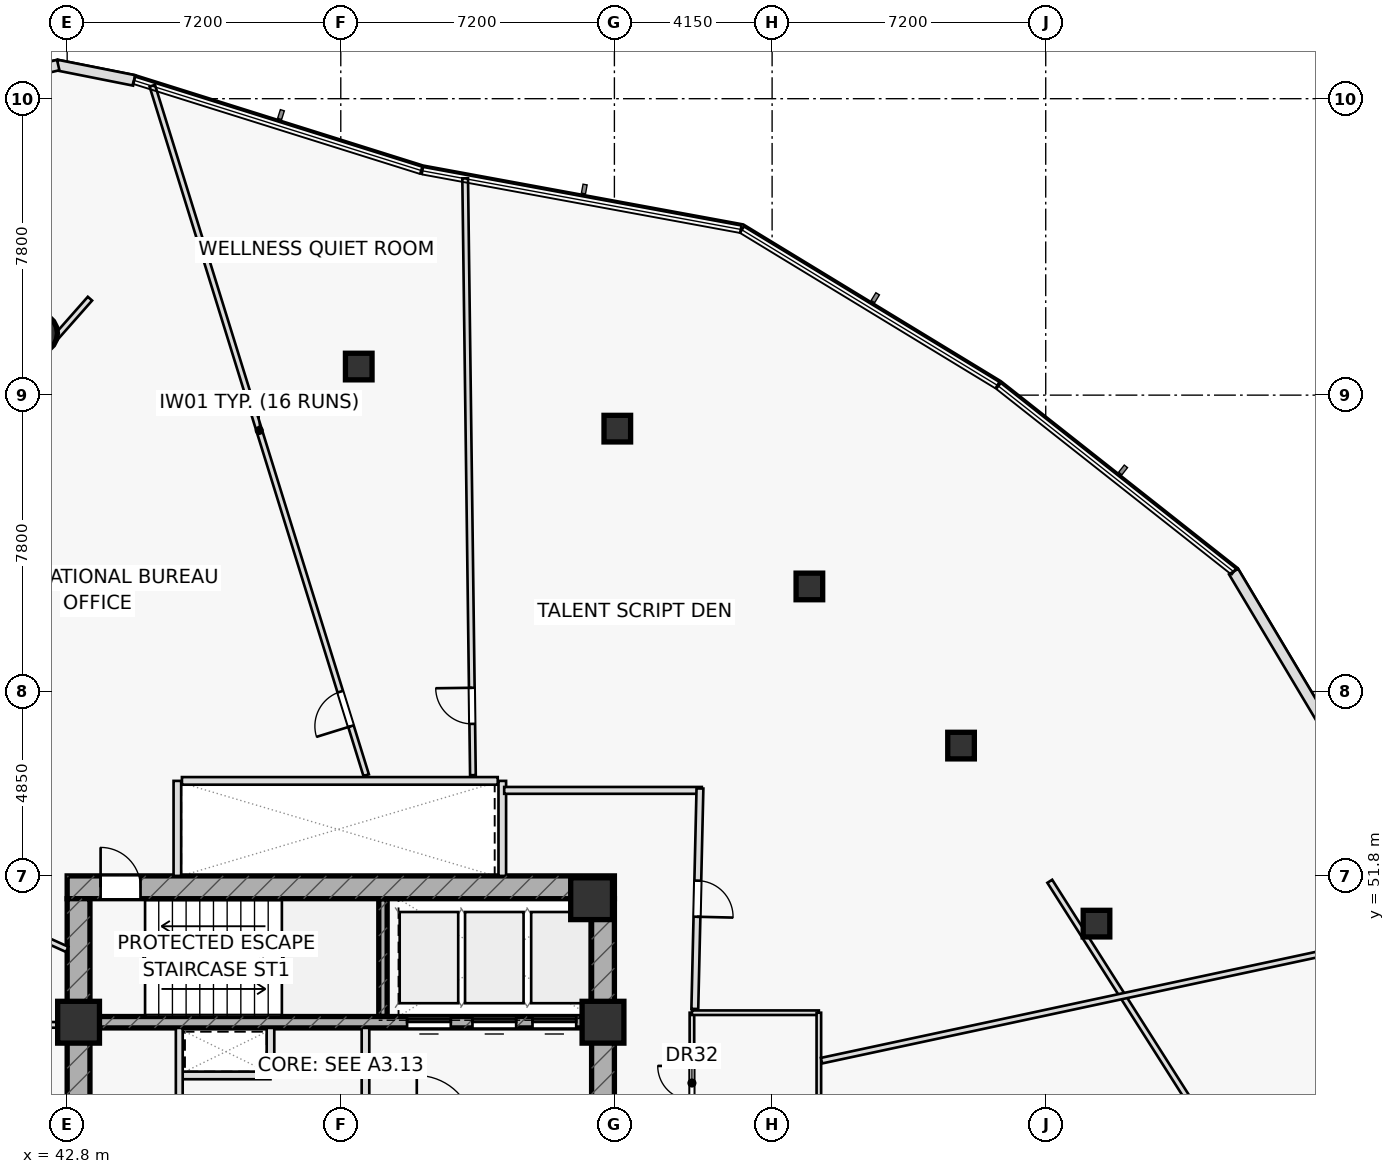
"""IFC4 building model, lengths in metres.
Left out: names, types, materials, properties, quantities, classifications, styles, units other than length and angle.
Written with IfcOpenShell. Run it as: python <this file> out.ifc"""

import sys

from ifc_helpers import new_model, si_unit, direction, frame, frame_2d, origin, origin_2d, place, context, subcontext, project, spatial, rectangle, hollow_rectangle, hollow_circle, extrude, element, fill, save


model = new_model("IFC4")
c1 = context("Model", 3, precision=1e-05, world=origin(), true_north=direction((0.0, 1.0)))
c2 = subcontext(c1, "Body", "Model", "MODEL_VIEW")
j1 = project(units=[si_unit("LENGTHUNIT", "METRE"), si_unit("PLANEANGLEUNIT", "RADIAN")], contexts=[c1])
p1 = place(None, origin())
s1 = spatial("IfcSite", under=j1, at=p1, CompositionType="ELEMENT")
p2 = place(p1, origin())
s2 = spatial("IfcBuilding", under=s1, at=p2, CompositionType="ELEMENT")
p3 = place(p2, frame((0.0, 0.0, 138.7)))
s3 = spatial("IfcBuildingStorey", under=s2, at=p3, CompositionType="ELEMENT", Elevation=138.7)
p4 = place(p3, frame((51.11, 48.1, 0.0), z_axis=(0.0, 0.0, 1.0), x_axis=(0.0, 1.0, 0.0)))
e1 = element("IfcWall", 1, at=p4, inside=s3, PredefinedType="SHEAR", context=c2, shape_type="SweptSolid", body=[
    extrude(rectangle(XDim=3.1, YDim=0.22, at=frame_2d((1.55, 0.0))), origin(), (0.0, 0.0, 1.0), 3.55),
])
p5 = place(p3, frame((42.8, 51.5, 0.0), z_axis=(0.0, 0.0, 1.0), x_axis=(1.0, 0.0, 0.0)))
e2 = element("IfcWall", 2, at=p5, inside=s3, PredefinedType="SHEAR", context=c2, shape_type="SweptSolid", body=[
    extrude(rectangle(XDim=14.4, YDim=0.6, at=frame_2d((7.2, 0.0))), origin(), (0.0, 0.0, 1.0), 3.55),
])
p6 = place(p5, frame((0.88, 0.0, 0.0)))
e3 = element("IfcOpeningElement", 3, at=p6, cuts=e2, PredefinedType="OPENING", context=c2, shape_type="SweptSolid", body=[
    extrude(rectangle(XDim=1.05, YDim=2.2, at=frame_2d((0.525, 1.1))), frame((0.0, 0.31, 0.0), z_axis=(0.0, -1.0, 0.0), x_axis=(1.0, 0.0, 0.0)), (0.0, 0.0, 1.0), 0.62),
])
p7 = place(p3, frame((43.1, 38.8, 0.0), z_axis=(0.0, 0.0, 1.0), x_axis=(0.0, 1.0, 0.0)))
e4 = element("IfcWall", 4, at=p7, inside=s3, PredefinedType="SHEAR", context=c2, shape_type="SweptSolid", body=[
    extrude(rectangle(XDim=12.4, YDim=0.6, at=frame_2d((6.2, 0.0))), origin(), (0.0, 0.0, 1.0), 3.55),
])
p8 = place(p3, frame((56.9, 38.8, 0.0), z_axis=(0.0, 0.0, 1.0), x_axis=(0.0, 1.0, 0.0)))
e5 = element("IfcWall", 5, at=p8, inside=s3, PredefinedType="SHEAR", context=c2, shape_type="SweptSolid", body=[
    extrude(rectangle(XDim=12.4, YDim=0.6, at=frame_2d((6.2, 0.0))), origin(), (0.0, 0.0, 1.0), 3.55),
])
p9 = place(p8, frame((3.85, 0.0, 0.0)))
e6 = element("IfcOpeningElement", 6, at=p9, cuts=e5, PredefinedType="OPENING", context=c2, shape_type="SweptSolid", body=[
    extrude(rectangle(XDim=1.5, YDim=2.2, at=frame_2d((0.75, 1.1))), frame((0.0, 0.31, 0.0), z_axis=(0.0, -1.0, 0.0), x_axis=(1.0, 0.0, 0.0)), (0.0, 0.0, 1.0), 0.62),
])
p10 = place(p3, frame((43.4, 47.95, 0.0), z_axis=(0.0, 0.0, 1.0), x_axis=(1.0, 0.0, 0.0)))
e7 = element("IfcWall", 7, at=p10, inside=s3, PredefinedType="SHEAR", context=c2, shape_type="SweptSolid", body=[
    extrude(rectangle(XDim=13.2, YDim=0.3, at=frame_2d((6.6, 0.0))), origin(), (0.0, 0.0, 1.0), 3.55),
])
p11 = place(p10, frame((8.345, 0.0, 0.0)))
e8 = element("IfcOpeningElement", 8, at=p11, cuts=e7, PredefinedType="OPENING", context=c2, shape_type="SweptSolid", body=[
    extrude(rectangle(XDim=1.15, YDim=2.2, at=frame_2d((0.575, 1.1))), frame((0.0, 0.16, 0.0), z_axis=(0.0, -1.0, 0.0), x_axis=(1.0, 0.0, 0.0)), (0.0, 0.0, 1.0), 0.32),
])
p12 = place(p10, frame((10.065, 0.0, 0.0)))
e9 = element("IfcOpeningElement", 9, at=p12, cuts=e7, PredefinedType="OPENING", context=c2, shape_type="SweptSolid", body=[
    extrude(rectangle(XDim=1.15, YDim=2.2, at=frame_2d((0.575, 1.1))), frame((0.0, 0.16, 0.0), z_axis=(0.0, -1.0, 0.0), x_axis=(1.0, 0.0, 0.0)), (0.0, 0.0, 1.0), 0.32),
])
p13 = place(p10, frame((11.645, 0.0, 0.0)))
e10 = element("IfcOpeningElement", 10, at=p13, cuts=e7, PredefinedType="OPENING", context=c2, shape_type="SweptSolid", body=[
    extrude(rectangle(XDim=1.15, YDim=2.2, at=frame_2d((0.575, 1.1))), frame((0.0, 0.16, 0.0), z_axis=(0.0, -1.0, 0.0), x_axis=(1.0, 0.0, 0.0)), (0.0, 0.0, 1.0), 0.32),
])
for number, where, z_axis, x_axis in (
    (11, (43.1, 47.95, 0.0), (0.0, 0.0, 1.0), (1.0, 0.0, 0.0)),
    (12, (56.9, 47.95, 0.0), (0.0, 0.0, 1.0), (1.0, 0.0, 0.0)),
    (13, (56.6, 51.2, 0.0), (0.0, 0.0, 1.0), (1.0, 0.0, 0.0)),
):
    element("IfcColumn", number, at=place(p3, frame(where, z_axis=z_axis, x_axis=x_axis)), inside=s3, PredefinedType="COLUMN", context=c2, shape_type="SweptSolid", body=[
        extrude(rectangle(XDim=1.1, YDim=1.1, at=origin_2d()), origin(), (0.0, 0.0, 1.0), 3.55),
    ])
p14 = place(p3, frame((42.011, 66.08, 0.0), z_axis=(0.0, 0.0, 1.0), x_axis=(1.0, 0.0, 0.0)))
e14 = element("IfcColumn", 14, at=p14, inside=s3, PredefinedType="COLUMN", context=c2, shape_type="SweptSolid", body=[
    extrude(hollow_circle(Radius=0.533, WallThickness=0.045, at=origin_2d()), origin(), (0.0, 0.0, 1.0), 3.55),
])
for number, where, z_axis, x_axis in (
    (15, (69.886, 50.544, 0.0), (0.0, 0.0, 1.0), (1.0, 0.0, 0.0)),
    (16, (66.322, 55.229, 0.0), (0.0, 0.0, 1.0), (1.0, 0.0, 0.0)),
    (17, (62.331, 59.416, 0.0), (0.0, 0.0, 1.0), (1.0, 0.0, 0.0)),
    (18, (57.277, 63.568, 0.0), (0.0, 0.0, 1.0), (1.0, 0.0, 0.0)),
    (19, (50.472, 65.202, 0.0), (0.0, 0.0, 1.0), (1.0, 0.0, 0.0)),
):
    element("IfcColumn", number, at=place(p3, frame(where, z_axis=z_axis, x_axis=x_axis)), inside=s3, PredefinedType="COLUMN", context=c2, shape_type="SweptSolid", body=[
        extrude(hollow_rectangle(XDim=0.7, YDim=0.7, WallThickness=0.04, at=origin_2d()), origin(), (0.0, 0.0, 1.0), 3.55),
    ])
for number, where, z_axis, x_axis in (
    (20, (45.7, 51.8, 0.0), (0.0, 0.0, 1.0), (0.0, 1.0, 0.0)),
    (21, (54.25, 51.8, 0.0), (0.0, 0.0, 1.0), (0.0, 1.0, 0.0)),
):
    element("IfcWall", number, at=place(p3, frame(where, z_axis=z_axis, x_axis=x_axis)), inside=s3, PredefinedType="PARTITIONING", context=c2, shape_type="SweptSolid", body=[
        extrude(rectangle(XDim=2.5, YDim=0.2, at=frame_2d((1.25, 0.0))), origin(), (0.0, 0.0, 1.0), 3.55),
    ])
p15 = place(p3, frame((45.75, 46.55, 0.0), z_axis=(0.0, 0.0, 1.0), x_axis=(1.0, 0.0, 0.0)))
e22 = element("IfcWall", 22, at=p15, inside=s3, PredefinedType="PARTITIONING", context=c2, shape_type="SweptSolid", body=[
    extrude(rectangle(XDim=2.4, YDim=0.2, at=frame_2d((1.2, 0.0))), origin(), (0.0, 0.0, 1.0), 3.55),
])
p16 = place(p3, frame((48.15, 46.55, 0.0), z_axis=(0.0, 0.0, 1.0), x_axis=(0.0, 1.0, 0.0)))
e23 = element("IfcWall", 23, at=p16, inside=s3, PredefinedType="PARTITIONING", context=c2, shape_type="SweptSolid", body=[
    extrude(rectangle(XDim=1.25, YDim=0.2, at=frame_2d((0.625, 0.0))), origin(), (0.0, 0.0, 1.0), 3.55),
])
p17 = place(p3, frame((50.65, 45.05, 0.0), z_axis=(0.0, 0.0, 1.0), x_axis=(0.0, 1.0, 0.0)))
e24 = element("IfcWall", 24, at=p17, inside=s3, PredefinedType="PARTITIONING", context=c2, shape_type="SweptSolid", body=[
    extrude(rectangle(XDim=2.75, YDim=0.2, at=frame_2d((1.375, 0.0))), origin(), (0.0, 0.0, 1.0), 3.55),
])
p18 = place(p3, frame((45.75, 42.2, 0.0), z_axis=(0.0, 0.0, 1.0), x_axis=(0.0, 1.0, 0.0)))
e25 = element("IfcWall", 25, at=p18, inside=s3, PredefinedType="PARTITIONING", context=c2, shape_type="SweptSolid", body=[
    extrude(rectangle(XDim=5.6, YDim=0.18, at=frame_2d((2.8, 0.0))), origin(), (0.0, 0.0, 1.0), 3.55),
])
p19 = place(p18, frame((0.55, 0.0, 0.0)))
e26 = element("IfcOpeningElement", 26, at=p19, cuts=e25, PredefinedType="OPENING", context=c2, shape_type="SweptSolid", body=[
    extrude(rectangle(XDim=0.9, YDim=2.05, at=frame_2d((0.45, 1.025))), frame((0.0, 0.1, 0.0), z_axis=(0.0, -1.0, 0.0), x_axis=(1.0, 0.0, 0.0)), (0.0, 0.0, 1.0), 0.2),
])
p20 = place(p18, frame((2.9, 0.0, 0.0)))
e27 = element("IfcOpeningElement", 27, at=p20, cuts=e25, PredefinedType="OPENING", context=c2, shape_type="SweptSolid", body=[
    extrude(rectangle(XDim=0.85, YDim=2.05, at=frame_2d((0.425, 1.025))), frame((0.0, 0.1, 0.0), z_axis=(0.0, -1.0, 0.0), x_axis=(1.0, 0.0, 0.0)), (0.0, 0.0, 1.0), 0.2),
])
p21 = place(p3, frame((43.4, 66.989, 0.0), z_axis=(0.0, 0.0, 1.0), x_axis=(-0.661622343701, -0.749837231881, 0.0)))
e28 = element("IfcWall", 28, at=p21, inside=s3, PredefinedType="PARTITIONING", context=c2, shape_type="SweptSolid", body=[
    extrude(rectangle(XDim=11.427, YDim=0.15, at=frame_2d((5.714, 0.0))), origin(), (0.0, 0.0, 1.0), 2.835),
])
p22 = place(p3, frame((74.163, 42.993, 0.0), z_axis=(0.0, 0.0, 1.0), x_axis=(-0.53628142437, 0.844039237166, 0.0)))
e29 = element("IfcWall", 29, at=p22, inside=s3, PredefinedType="PARTITIONING", context=c2, shape_type="SweptSolid", body=[
    extrude(rectangle(XDim=10.267, YDim=0.15, at=frame_2d((5.133, 0.0))), origin(), (0.0, 0.0, 1.0), 2.835),
])
p23 = place(p3, frame((37.14, 47.88, 0.0), z_axis=(0.0, 0.0, 1.0), x_axis=(1.0, 0.0, 0.0)))
e30 = element("IfcWall", 30, at=p23, inside=s3, PredefinedType="PARTITIONING", context=c2, shape_type="SweptSolid", body=[
    extrude(rectangle(XDim=5.66, YDim=0.15, at=frame_2d((2.83, 0.0))), origin(), (0.0, 0.0, 1.0), 2.835),
])
p24 = place(p3, frame((59.24, 41.2, 0.0), z_axis=(0.0, 0.0, 1.0), x_axis=(0.0, 1.0, 0.0)))
e31 = element("IfcWall", 31, at=p24, inside=s3, PredefinedType="PARTITIONING", context=c2, shape_type="SweptSolid", body=[
    extrude(rectangle(XDim=7.0, YDim=0.12, at=frame_2d((3.5, 0.0))), origin(), (0.0, 0.0, 1.0), 3.55),
])
p25 = place(p24, frame((1.15, 0.0, 0.0)))
e32 = element("IfcOpeningElement", 32, at=p25, cuts=e31, PredefinedType="OPENING", context=c2, shape_type="SweptSolid", body=[
    extrude(rectangle(XDim=0.9, YDim=2.05, at=frame_2d((0.45, 1.025))), frame((0.0, 0.07, 0.0), z_axis=(0.0, -1.0, 0.0), x_axis=(1.0, 0.0, 0.0)), (0.0, 0.0, 1.0), 0.14),
])
p26 = place(p24, frame((4.7, 0.0, 0.0)))
e33 = element("IfcOpeningElement", 33, at=p26, cuts=e31, PredefinedType="OPENING", context=c2, shape_type="SweptSolid", body=[
    extrude(rectangle(XDim=0.9, YDim=2.05, at=frame_2d((0.45, 1.025))), frame((0.0, 0.07, 0.0), z_axis=(0.0, -1.0, 0.0), x_axis=(1.0, 0.0, 0.0)), (0.0, 0.0, 1.0), 0.14),
])
p27 = place(p3, frame((59.24, 48.2, 0.0), z_axis=(0.0, 0.0, 1.0), x_axis=(1.0, 0.0, 0.0)))
e34 = element("IfcWall", 34, at=p27, inside=s3, PredefinedType="PARTITIONING", context=c2, shape_type="SweptSolid", body=[
    extrude(rectangle(XDim=3.34, YDim=0.12, at=frame_2d((1.67, 0.0))), origin(), (0.0, 0.0, 1.0), 3.55),
])
p28 = place(p3, frame((62.58, 41.2, 0.0), z_axis=(0.0, 0.0, 1.0), x_axis=(0.0, 1.0, 0.0)))
e35 = element("IfcWall", 35, at=p28, inside=s3, PredefinedType="PARTITIONING", context=c2, shape_type="SweptSolid", body=[
    extrude(rectangle(XDim=7.0, YDim=0.12, at=frame_2d((3.5, 0.0))), origin(), (0.0, 0.0, 1.0), 3.55),
])
p29 = place(p3, frame((62.65, 46.938, 0.0), z_axis=(0.0, 0.0, 1.0), x_axis=(0.977819728846, 0.209448270173, 0.0)))
e36 = element("IfcWall", 36, at=p29, inside=s3, PredefinedType="PARTITIONING", context=c2, shape_type="SweptSolid", body=[
    extrude(rectangle(XDim=17.123, YDim=0.15, at=frame_2d((8.562, 0.0))), origin(), (0.0, 0.0, 1.0), 2.975),
])
p30 = place(p3, frame((53.477, 54.45, 0.0), z_axis=(0.0, 0.0, 1.0), x_axis=(-0.012994596741, 0.999915566663, 0.0)))
e37 = element("IfcWall", 37, at=p30, inside=s3, PredefinedType="PARTITIONING", context=c2, shape_type="SweptSolid", body=[
    extrude(rectangle(XDim=15.707, YDim=0.15, at=frame_2d((7.853, 0.0))), origin(), (0.0, 0.0, 1.0), 2.835),
])
p31 = place(p30, frame((1.35, 0.0, 0.0)))
e38 = element("IfcOpeningElement", 38, at=p31, cuts=e37, PredefinedType="OPENING", context=c2, shape_type="SweptSolid", body=[
    extrude(rectangle(XDim=0.95, YDim=2.05, at=frame_2d((0.475, 1.025))), frame((0.0, 0.085, 0.0), z_axis=(0.0, -1.0, 0.0), x_axis=(1.0, 0.0, 0.0)), (0.0, 0.0, 1.0), 0.17),
])
p32 = place(p3, frame((50.668, 54.45, 0.0), z_axis=(0.0, 0.0, 1.0), x_axis=(-0.29631148368, 0.955091359316, 0.0)))
e39 = element("IfcWall", 39, at=p32, inside=s3, PredefinedType="PARTITIONING", context=c2, shape_type="SweptSolid", body=[
    extrude(rectangle(XDim=18.994, YDim=0.15, at=frame_2d((9.497, 0.0))), origin(), (0.0, 0.0, 1.0), 2.975),
])
p33 = place(p32, frame((1.35, 0.0, 0.0)))
e40 = element("IfcOpeningElement", 40, at=p33, cuts=e39, PredefinedType="OPENING", context=c2, shape_type="SweptSolid", body=[
    extrude(rectangle(XDim=0.95, YDim=2.05, at=frame_2d((0.475, 1.025))), frame((0.0, 0.085, 0.0), z_axis=(0.0, -1.0, 0.0), x_axis=(1.0, 0.0, 0.0)), (0.0, 0.0, 1.0), 0.17),
])
p34 = place(p3, frame((42.8, 49.867, 0.0), z_axis=(0.0, 0.0, 1.0), x_axis=(-0.911695751271, 0.410865984372, 0.0)))
e41 = element("IfcWall", 41, at=p34, inside=s3, PredefinedType="PARTITIONING", context=c2, shape_type="SweptSolid", body=[
    extrude(rectangle(XDim=10.893, YDim=0.15, at=frame_2d((5.447, 0.0))), origin(), (0.0, 0.0, 1.0), 2.835),
])
p35 = place(p34, frame((1.35, 0.0, 0.0)))
e42 = element("IfcOpeningElement", 42, at=p35, cuts=e41, PredefinedType="OPENING", context=c2, shape_type="SweptSolid", body=[
    extrude(rectangle(XDim=0.95, YDim=2.05, at=frame_2d((0.475, 1.025))), frame((0.0, 0.085, 0.0), z_axis=(0.0, -1.0, 0.0), x_axis=(1.0, 0.0, 0.0)), (0.0, 0.0, 1.0), 0.17),
])
p36 = place(p3, frame((54.3, 54.05, 0.0), z_axis=(0.0, 0.0, 1.0), x_axis=(1.0, 0.0, 0.0)))
e43 = element("IfcWall", 43, at=p36, inside=s3, PredefinedType="PARTITIONING", context=c2, shape_type="SweptSolid", body=[
    extrude(rectangle(XDim=5.2, YDim=0.18, at=frame_2d((2.6, 0.0))), origin(), (0.0, 0.0, 1.0), 2.835),
])
p37 = place(p3, frame((59.451, 54.1, 0.0), z_axis=(0.0, 0.0, 1.0), x_axis=(-0.023271046154, -0.999729192537, 0.0)))
e44 = element("IfcWall", 44, at=p37, inside=s3, PredefinedType="PARTITIONING", context=c2, shape_type="SweptSolid", body=[
    extrude(rectangle(XDim=5.802, YDim=0.18, at=frame_2d((2.901, 0.0))), origin(), (0.0, 0.0, 1.0), 2.835),
])
p38 = place(p37, frame((2.426, 0.0, 0.0)))
e45 = element("IfcOpeningElement", 45, at=p38, cuts=e44, PredefinedType="OPENING", context=c2, shape_type="SweptSolid", body=[
    extrude(rectangle(XDim=0.95, YDim=2.05, at=frame_2d((0.475, 1.025))), frame((0.0, 0.1, 0.0), z_axis=(0.0, -1.0, 0.0), x_axis=(1.0, 0.0, 0.0)), (0.0, 0.0, 1.0), 0.2),
])
p39 = place(p3, frame((44.562, 72.731, 0.0), z_axis=(0.0, 0.0, 1.0), x_axis=(-0.98078915881, 0.195070822936, 0.0)))
e46 = element("IfcWall", 46, at=p39, inside=s3, PredefinedType="STANDARD", context=c2, shape_type="SweptSolid", body=[
    extrude(rectangle(XDim=2.066, YDim=0.28, at=frame_2d((1.033, 0.0))), origin(), (0.0, 0.0, 1.0), 3.55),
])
p40 = place(p3, frame((42.565, 73.135, 0.0), z_axis=(0.0, 0.0, 1.0), x_axis=(-0.97418452395, -0.225753213258, 0.0)))
e47 = element("IfcWall", 47, at=p40, inside=s3, PredefinedType="STANDARD", context=c2, shape_type="SweptSolid", body=[
    extrude(rectangle(XDim=2.055, YDim=0.28, at=frame_2d((1.027, 0.0))), origin(), (0.0, 0.0, 1.0), 3.55),
])
p41 = place(p3, frame((77.885, 52.448, 0.0), z_axis=(0.0, 0.0, 1.0), x_axis=(-0.512462591372, 0.858709550689, 0.0)))
e48 = element("IfcWall", 48, at=p41, inside=s3, PredefinedType="STANDARD", context=c2, shape_type="SweptSolid", body=[
    extrude(rectangle(XDim=8.571, YDim=0.28, at=frame_2d((4.285, 0.0))), origin(), (0.0, 0.0, 1.0), 3.55),
])
p42 = place(p3, frame((45.82, 54.3, 0.0), z_axis=(0.0, 0.0, 1.0), x_axis=(1.0, 0.0, 0.0)))
e49 = element("IfcWall", 49, at=p42, inside=s3, PredefinedType="PARTITIONING", context=c2, shape_type="SweptSolid", body=[
    extrude(rectangle(XDim=8.31, YDim=0.2, at=frame_2d((4.155, 0.0))), origin(), (0.0, 0.0, 1.0), 3.55),
])
p43 = place(p6, origin())
e50 = element("IfcDoor", 50, at=p43, inside=s3, OperationType="SINGLE_SWING_LEFT", PredefinedType="DOOR", context=c2, shape_type="SweptSolid", body=[
    extrude(rectangle(XDim=1.05, YDim=2.2, at=frame_2d((0.525, 1.1))), frame((0.0, 0.025, 0.0), z_axis=(0.0, -1.0, 0.0), x_axis=(1.0, 0.0, 0.0)), (0.0, 0.0, 1.0), 0.05),
])
fill(e3, e50)
p44 = place(p26, origin())
e51 = element("IfcDoor", 51, at=p44, inside=s3, OperationType="SINGLE_SWING_RIGHT", PredefinedType="DOOR", context=c2, shape_type="SweptSolid", body=[
    extrude(rectangle(XDim=0.9, YDim=2.05, at=frame_2d((0.45, 1.025))), frame((0.0, 0.025, 0.0), z_axis=(0.0, -1.0, 0.0), x_axis=(1.0, 0.0, 0.0)), (0.0, 0.0, 1.0), 0.05),
])
fill(e33, e51)
p45 = place(p31, origin())
e52 = element("IfcDoor", 52, at=p45, inside=s3, OperationType="SINGLE_SWING_RIGHT", PredefinedType="DOOR", context=c2, shape_type="SweptSolid", body=[
    extrude(rectangle(XDim=0.95, YDim=2.05, at=frame_2d((0.475, 1.025))), frame((0.0, 0.025, 0.0), z_axis=(0.0, -1.0, 0.0), x_axis=(1.0, 0.0, 0.0)), (0.0, 0.0, 1.0), 0.05),
])
fill(e38, e52)
p46 = place(p33, origin())
e53 = element("IfcDoor", 53, at=p46, inside=s3, OperationType="SINGLE_SWING_LEFT", PredefinedType="DOOR", context=c2, shape_type="SweptSolid", body=[
    extrude(rectangle(XDim=0.95, YDim=2.05, at=frame_2d((0.475, 1.025))), frame((0.0, 0.025, 0.0), z_axis=(0.0, -1.0, 0.0), x_axis=(1.0, 0.0, 0.0)), (0.0, 0.0, 1.0), 0.05),
])
fill(e40, e53)
p47 = place(p38, origin())
e54 = element("IfcDoor", 54, at=p47, inside=s3, OperationType="SINGLE_SWING_RIGHT", PredefinedType="DOOR", context=c2, shape_type="SweptSolid", body=[
    extrude(rectangle(XDim=0.95, YDim=2.05, at=frame_2d((0.475, 1.025))), frame((0.0, 0.025, 0.0), z_axis=(0.0, -1.0, 0.0), x_axis=(1.0, 0.0, 0.0)), (0.0, 0.0, 1.0), 0.05),
])
fill(e45, e54)
p48 = place(p11, origin())
e55 = element("IfcDoor", 55, at=p48, inside=s3, OperationType="SLIDING_TO_LEFT", PredefinedType="DOOR", context=c2, shape_type="SweptSolid", body=[
    extrude(rectangle(XDim=1.15, YDim=2.2, at=frame_2d((0.575, 1.1))), frame((0.0, 0.025, 0.0), z_axis=(0.0, -1.0, 0.0), x_axis=(1.0, 0.0, 0.0)), (0.0, 0.0, 1.0), 0.05),
])
fill(e8, e55)
p49 = place(p12, origin())
e56 = element("IfcDoor", 56, at=p49, inside=s3, OperationType="SLIDING_TO_LEFT", PredefinedType="DOOR", context=c2, shape_type="SweptSolid", body=[
    extrude(rectangle(XDim=1.15, YDim=2.2, at=frame_2d((0.575, 1.1))), frame((0.0, 0.025, 0.0), z_axis=(0.0, -1.0, 0.0), x_axis=(1.0, 0.0, 0.0)), (0.0, 0.0, 1.0), 0.05),
])
fill(e9, e56)
p50 = place(p13, origin())
e57 = element("IfcDoor", 57, at=p50, inside=s3, OperationType="SLIDING_TO_LEFT", PredefinedType="DOOR", context=c2, shape_type="SweptSolid", body=[
    extrude(rectangle(XDim=1.15, YDim=2.2, at=frame_2d((0.575, 1.1))), frame((0.0, 0.025, 0.0), z_axis=(0.0, -1.0, 0.0), x_axis=(1.0, 0.0, 0.0)), (0.0, 0.0, 1.0), 0.05),
])
fill(e10, e57)
save(model, sys.argv[1])
